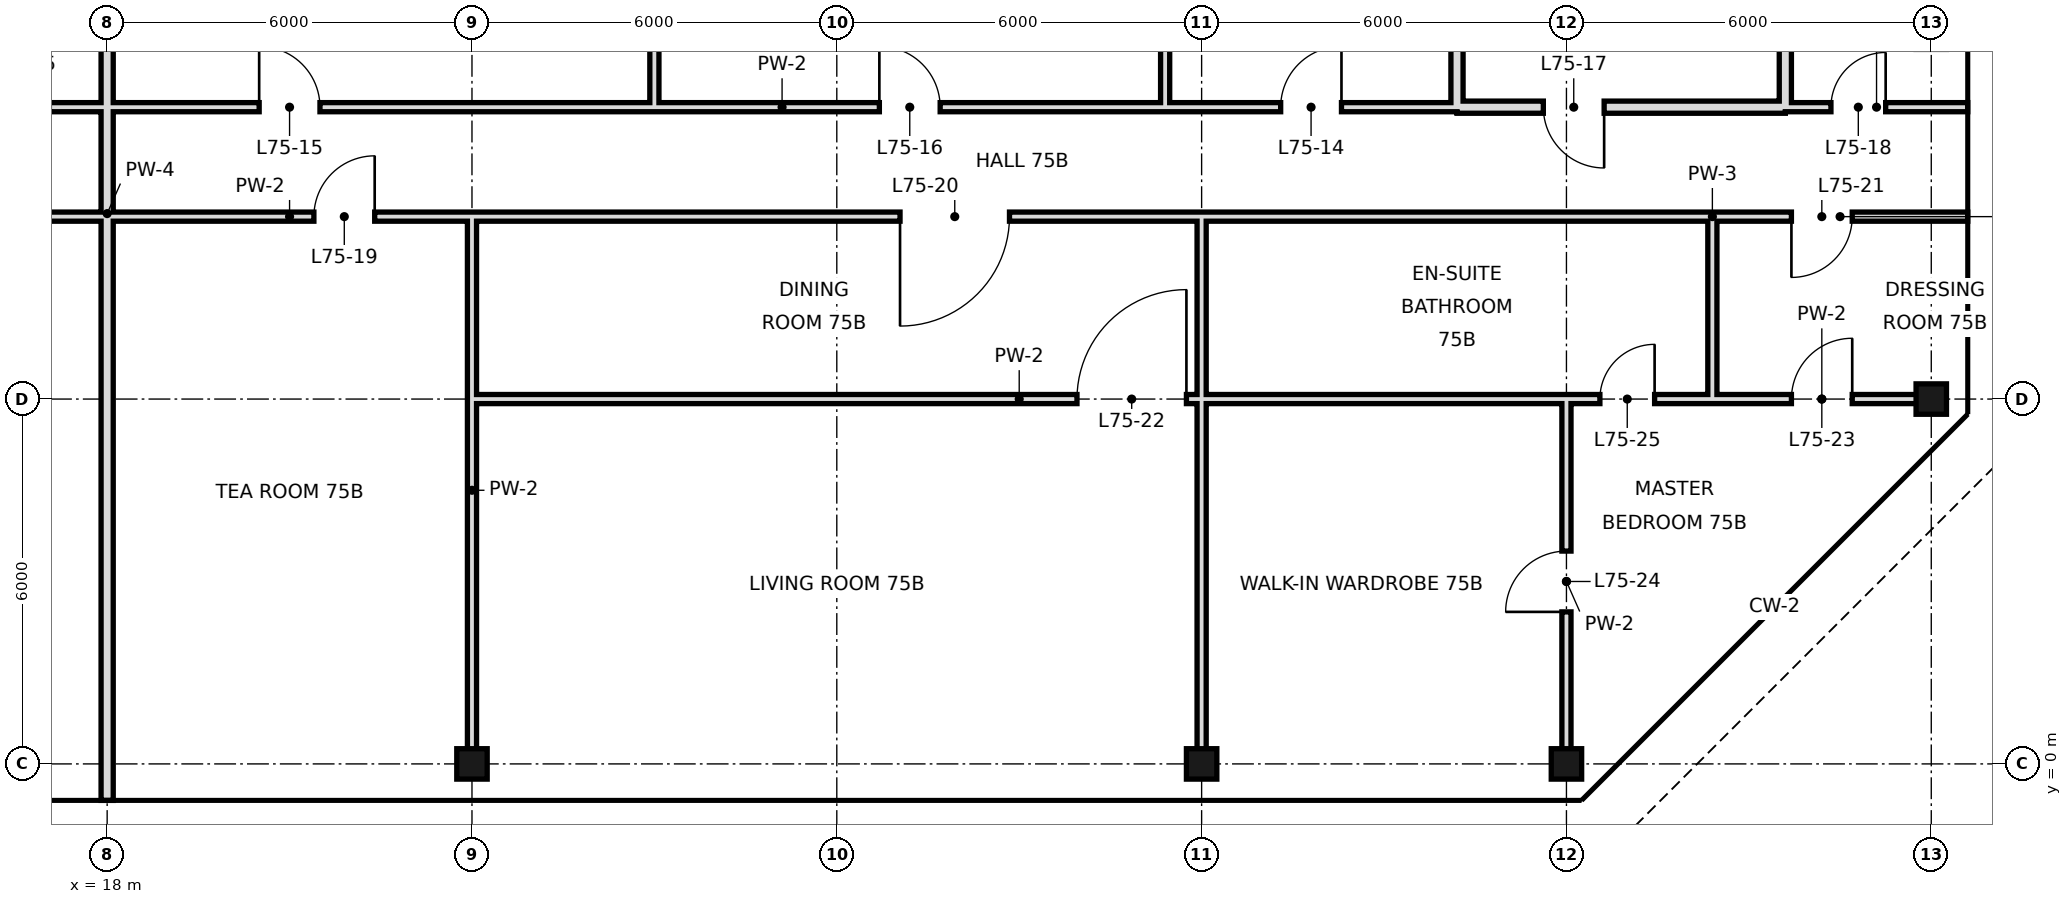
"""IFC4 building model, lengths in metres.
Left out: names, types, materials, properties, quantities, classifications, styles, units other than length and angle.
Written with IfcOpenShell. Run it as: python <this file> out.ifc"""

import sys

from ifc_helpers import new_model, si_unit, direction, frame, frame_2d, origin, origin_2d, place, context, subcontext, project, spatial, rectangle, hollow_rectangle, extrude, element, fill, save


model = new_model("IFC4")
c1 = context("Model", 3, precision=1e-05, world=origin(), true_north=direction((0.0, 1.0)))
c2 = subcontext(c1, "Body", "Model", "MODEL_VIEW")
j1 = project(units=[si_unit("LENGTHUNIT", "METRE"), si_unit("PLANEANGLEUNIT", "RADIAN")], contexts=[c1])
p1 = place(None, origin())
s1 = spatial("IfcSite", under=j1, at=p1, CompositionType="ELEMENT")
p2 = place(p1, origin())
s2 = spatial("IfcBuilding", under=s1, at=p2, CompositionType="ELEMENT")
p3 = place(p2, frame((0.0, 0.0, 316.0)))
s3 = spatial("IfcBuildingStorey", under=s2, at=p3, CompositionType="ELEMENT", Elevation=316.0)
for number, where, z_axis, x_axis in (
    (1, (24.0, 0.0, 0.0), (0.0, 0.0, 1.0), (1.0, 0.0, 0.0)),
    (2, (36.0, 0.0, 0.0), (0.0, 0.0, 1.0), (1.0, 0.0, 0.0)),
    (3, (42.0, 0.0, 0.0), (0.0, 0.0, 1.0), (1.0, 0.0, 0.0)),
    (4, (48.0, 6.0, 0.0), (0.0, 0.0, 1.0), (1.0, 0.0, 0.0)),
):
    element("IfcColumn", number, at=place(p3, frame(where, z_axis=z_axis, x_axis=x_axis)), inside=s3, PredefinedType="COLUMN", context=c2, shape_type="SweptSolid", body=[
        extrude(hollow_rectangle(XDim=0.5, YDim=0.5, WallThickness=0.025, at=origin_2d()), origin(), (0.0, 0.0, 1.0), 3.6),
    ])
p4 = place(p3, frame((18.0, -0.6, 0.0), z_axis=(0.0, 0.0, 1.0), x_axis=(0.0, 1.0, 0.0)))
e5 = element("IfcWall", 5, at=p4, inside=s3, PredefinedType="SOLIDWALL", context=c2, shape_type="SweptSolid", body=[
    extrude(rectangle(XDim=19.3, YDim=0.2, at=frame_2d((9.65, 0.0))), origin(), (0.0, 0.0, 1.0), 2.72),
])
p5 = place(p3, frame((24.0, 0.0, 0.0), z_axis=(0.0, 0.0, 1.0), x_axis=(0.0, 1.0, 0.0)))
e6 = element("IfcWall", 6, at=p5, inside=s3, PredefinedType="PARTITIONING", context=c2, shape_type="SweptSolid", body=[
    extrude(rectangle(XDim=9.0, YDim=0.15, at=frame_2d((4.5, 0.0))), origin(), (0.0, 0.0, 1.0), 2.72),
])
for number, where, z_axis, x_axis in (
    (7, (27.0, 10.8, 0.0), (0.0, 0.0, 1.0), (0.0, 1.0, 0.0)),
    (8, (35.4, 10.8, 0.0), (0.0, 0.0, 1.0), (0.0, 1.0, 0.0)),
):
    element("IfcWall", number, at=place(p3, frame(where, z_axis=z_axis, x_axis=x_axis)), inside=s3, PredefinedType="PARTITIONING", context=c2, shape_type="SweptSolid", body=[
        extrude(rectangle(XDim=7.9, YDim=0.15, at=frame_2d((3.95, 0.0))), origin(), (0.0, 0.0, 1.0), 3.42),
    ])
p6 = place(p3, frame((36.0, 0.0, 0.0), z_axis=(0.0, 0.0, 1.0), x_axis=(0.0, 1.0, 0.0)))
e9 = element("IfcWall", 9, at=p6, inside=s3, PredefinedType="PARTITIONING", context=c2, shape_type="SweptSolid", body=[
    extrude(rectangle(XDim=6.0, YDim=0.15, at=frame_2d((3.0, 0.0))), origin(), (0.0, 0.0, 1.0), 2.72),
])
p7 = place(p3, frame((36.0, 6.0, 0.0), z_axis=(0.0, 0.0, 1.0), x_axis=(0.0, 1.0, 0.0)))
e10 = element("IfcWall", 10, at=p7, inside=s3, PredefinedType="PARTITIONING", context=c2, shape_type="SweptSolid", body=[
    extrude(rectangle(XDim=3.0, YDim=0.15, at=frame_2d((1.5, 0.0))), origin(), (0.0, 0.0, 1.0), 2.72),
])
p8 = place(p3, frame((40.2, 10.8, 0.0), z_axis=(0.0, 0.0, 1.0), x_axis=(0.0, 1.0, 0.0)))
e11 = element("IfcWall", 11, at=p8, inside=s3, PredefinedType="SOLIDWALL", context=c2, shape_type="SweptSolid", body=[
    extrude(rectangle(XDim=7.9, YDim=0.2, at=frame_2d((3.95, 0.0))), origin(), (0.0, 0.0, 1.0), 2.72),
])
p9 = place(p3, frame((42.0, 0.0, 0.0), z_axis=(0.0, 0.0, 1.0), x_axis=(0.0, 1.0, 0.0)))
e12 = element("IfcWall", 12, at=p9, inside=s3, PredefinedType="PARTITIONING", context=c2, shape_type="SweptSolid", body=[
    extrude(rectangle(XDim=6.0, YDim=0.15, at=frame_2d((3.0, 0.0))), origin(), (0.0, 0.0, 1.0), 2.72),
])
p10 = place(p9, frame((2.5, 0.0, 0.0)))
e13 = element("IfcOpeningElement", 13, at=p10, cuts=e12, PredefinedType="OPENING", context=c2, shape_type="SweptSolid", body=[
    extrude(rectangle(XDim=1.0, YDim=2.4, at=frame_2d((0.5, 1.2))), frame((0.0, 0.085, 0.0), z_axis=(0.0, -1.0, 0.0), x_axis=(1.0, 0.0, 0.0)), (0.0, 0.0, 1.0), 0.17),
])
p11 = place(p3, frame((44.4, 6.0, 0.0), z_axis=(0.0, 0.0, 1.0), x_axis=(0.0, 1.0, 0.0)))
e14 = element("IfcWall", 14, at=p11, inside=s3, PredefinedType="PARTITIONING", context=c2, shape_type="SweptSolid", body=[
    extrude(rectangle(XDim=3.0, YDim=0.15, at=frame_2d((1.5, 0.0))), origin(), (0.0, 0.0, 1.0), 3.42),
])
p12 = place(p3, frame((45.6, 10.8, 0.0), z_axis=(0.0, 0.0, 1.0), x_axis=(0.0, 1.0, 0.0)))
e15 = element("IfcWall", 15, at=p12, inside=s3, PredefinedType="SOLIDWALL", context=c2, shape_type="SweptSolid", body=[
    extrude(rectangle(XDim=7.2, YDim=0.2, at=frame_2d((3.6, 0.0))), origin(), (0.0, 0.0, 1.0), 2.72),
])
p13 = place(p3, frame((40.2, 10.8, 0.0), z_axis=(0.0, 0.0, 1.0), x_axis=(1.0, 0.0, 0.0)))
e16 = element("IfcWall", 16, at=p13, inside=s3, PredefinedType="SOLIDWALL", context=c2, shape_type="SweptSolid", body=[
    extrude(rectangle(XDim=5.4, YDim=0.2, at=frame_2d((2.7, 0.0))), origin(), (0.0, 0.0, 1.0), 2.72),
])
p14 = place(p13, frame((1.42, 0.0, 0.0)))
e17 = element("IfcOpeningElement", 17, at=p14, cuts=e16, PredefinedType="OPENING", context=c2, shape_type="SweptSolid", body=[
    extrude(rectangle(XDim=1.0, YDim=2.4, at=frame_2d((0.5, 1.2))), frame((0.0, 0.11, 0.0), z_axis=(0.0, -1.0, 0.0), x_axis=(1.0, 0.0, 0.0)), (0.0, 0.0, 1.0), 0.22),
])
p15 = place(p3, frame((18.0, 10.8, 0.0), z_axis=(0.0, 0.0, 1.0), x_axis=(1.0, 0.0, 0.0)))
e18 = element("IfcWall", 18, at=p15, inside=s3, PredefinedType="PARTITIONING", context=c2, shape_type="SweptSolid", body=[
    extrude(rectangle(XDim=22.2, YDim=0.15, at=frame_2d((11.1, 0.0))), origin(), (0.0, 0.0, 1.0), 3.42),
])
p16 = place(p15, frame((19.3, 0.0, 0.0)))
e19 = element("IfcOpeningElement", 19, at=p16, cuts=e18, PredefinedType="OPENING", context=c2, shape_type="SweptSolid", body=[
    extrude(rectangle(XDim=1.0, YDim=2.4, at=frame_2d((0.5, 1.2))), frame((0.0, 0.085, 0.0), z_axis=(0.0, -1.0, 0.0), x_axis=(1.0, 0.0, 0.0)), (0.0, 0.0, 1.0), 0.17),
])
p17 = place(p15, frame((2.5, 0.0, 0.0)))
e20 = element("IfcOpeningElement", 20, at=p17, cuts=e18, PredefinedType="OPENING", context=c2, shape_type="SweptSolid", body=[
    extrude(rectangle(XDim=1.0, YDim=2.4, at=frame_2d((0.5, 1.2))), frame((0.0, 0.085, 0.0), z_axis=(0.0, -1.0, 0.0), x_axis=(1.0, 0.0, 0.0)), (0.0, 0.0, 1.0), 0.17),
])
p18 = place(p15, frame((12.7, 0.0, 0.0)))
e21 = element("IfcOpeningElement", 21, at=p18, cuts=e18, PredefinedType="OPENING", context=c2, shape_type="SweptSolid", body=[
    extrude(rectangle(XDim=1.0, YDim=2.4, at=frame_2d((0.5, 1.2))), frame((0.0, 0.085, 0.0), z_axis=(0.0, -1.0, 0.0), x_axis=(1.0, 0.0, 0.0)), (0.0, 0.0, 1.0), 0.17),
])
p19 = place(p3, frame((15.6, 10.8, 0.0), z_axis=(0.0, 0.0, 1.0), x_axis=(1.0, 0.0, 0.0)))
e22 = element("IfcWall", 22, at=p19, inside=s3, PredefinedType="PARTITIONING", context=c2, shape_type="SweptSolid", body=[
    extrude(rectangle(XDim=2.4, YDim=0.15, at=frame_2d((1.2, 0.0))), origin(), (0.0, 0.0, 1.0), 3.42),
])
p20 = place(p19, frame((0.55, 0.0, 0.0)))
e23 = element("IfcOpeningElement", 23, at=p20, cuts=e22, PredefinedType="OPENING", context=c2, shape_type="SweptSolid", body=[
    extrude(rectangle(XDim=0.9, YDim=2.4, at=frame_2d((0.45, 1.2))), frame((0.0, 0.085, 0.0), z_axis=(0.0, -1.0, 0.0), x_axis=(1.0, 0.0, 0.0)), (0.0, 0.0, 1.0), 0.17),
])
p21 = place(p3, frame((45.6, 10.8, 0.0), z_axis=(0.0, 0.0, 1.0), x_axis=(1.0, 0.0, 0.0)))
e24 = element("IfcWall", 24, at=p21, inside=s3, PredefinedType="PARTITIONING", context=c2, shape_type="SweptSolid", body=[
    extrude(rectangle(XDim=3.0, YDim=0.15, at=frame_2d((1.5, 0.0))), origin(), (0.0, 0.0, 1.0), 3.42),
])
p22 = place(p21, frame((0.75, 0.0, 0.0)))
e25 = element("IfcOpeningElement", 25, at=p22, cuts=e24, PredefinedType="OPENING", context=c2, shape_type="SweptSolid", body=[
    extrude(rectangle(XDim=0.9, YDim=2.4, at=frame_2d((0.45, 1.2))), frame((0.0, 0.085, 0.0), z_axis=(0.0, -1.0, 0.0), x_axis=(1.0, 0.0, 0.0)), (0.0, 0.0, 1.0), 0.17),
])
p23 = place(p3, frame((24.0, 6.0, 0.0), z_axis=(0.0, 0.0, 1.0), x_axis=(1.0, 0.0, 0.0)))
e26 = element("IfcWall", 26, at=p23, inside=s3, PredefinedType="PARTITIONING", context=c2, shape_type="SweptSolid", body=[
    extrude(rectangle(XDim=12.0, YDim=0.15, at=frame_2d((6.0, 0.0))), origin(), (0.0, 0.0, 1.0), 2.97),
])
p24 = place(p23, frame((9.95, 0.0, 0.0)))
e27 = element("IfcOpeningElement", 27, at=p24, cuts=e26, PredefinedType="OPENING", context=c2, shape_type="SweptSolid", body=[
    extrude(rectangle(XDim=1.8, YDim=2.4, at=frame_2d((0.9, 1.2))), frame((0.0, 0.085, 0.0), z_axis=(0.0, -1.0, 0.0), x_axis=(1.0, 0.0, 0.0)), (0.0, 0.0, 1.0), 0.17),
])
p25 = place(p3, frame((44.4, 6.0, 0.0), z_axis=(0.0, 0.0, 1.0), x_axis=(1.0, 0.0, 0.0)))
e28 = element("IfcWall", 28, at=p25, inside=s3, PredefinedType="PARTITIONING", context=c2, shape_type="SweptSolid", body=[
    extrude(rectangle(XDim=3.6, YDim=0.15, at=frame_2d((1.8, 0.0))), origin(), (0.0, 0.0, 1.0), 2.97),
])
p26 = place(p25, frame((1.3, 0.0, 0.0)))
e29 = element("IfcOpeningElement", 29, at=p26, cuts=e28, PredefinedType="OPENING", context=c2, shape_type="SweptSolid", body=[
    extrude(rectangle(XDim=1.0, YDim=2.4, at=frame_2d((0.5, 1.2))), frame((0.0, 0.085, 0.0), z_axis=(0.0, -1.0, 0.0), x_axis=(1.0, 0.0, 0.0)), (0.0, 0.0, 1.0), 0.17),
])
p27 = place(p3, frame((36.0, 6.0, 0.0), z_axis=(0.0, 0.0, 1.0), x_axis=(1.0, 0.0, 0.0)))
e30 = element("IfcWall", 30, at=p27, inside=s3, PredefinedType="PARTITIONING", context=c2, shape_type="SweptSolid", body=[
    extrude(rectangle(XDim=8.4, YDim=0.15, at=frame_2d((4.2, 0.0))), origin(), (0.0, 0.0, 1.0), 2.97),
])
p28 = place(p27, frame((6.55, 0.0, 0.0)))
e31 = element("IfcOpeningElement", 31, at=p28, cuts=e30, PredefinedType="OPENING", context=c2, shape_type="SweptSolid", body=[
    extrude(rectangle(XDim=0.9, YDim=2.4, at=frame_2d((0.45, 1.2))), frame((0.0, 0.085, 0.0), z_axis=(0.0, -1.0, 0.0), x_axis=(1.0, 0.0, 0.0)), (0.0, 0.0, 1.0), 0.17),
])
p29 = place(p3, frame((6.0, 9.0, 0.0), z_axis=(0.0, 0.0, 1.0), x_axis=(1.0, 0.0, 0.0)))
e32 = element("IfcWall", 32, at=p29, inside=s3, PredefinedType="PARTITIONING", context=c2, shape_type="SweptSolid", body=[
    extrude(rectangle(XDim=30.0, YDim=0.15, at=frame_2d((15.0, 0.0))), origin(), (0.0, 0.0, 1.0), 3.42),
])
p30 = place(p29, frame((2.5, 0.0, 0.0)))
e33 = element("IfcOpeningElement", 33, at=p30, cuts=e32, PredefinedType="OPENING", context=c2, shape_type="SweptSolid", body=[
    extrude(rectangle(XDim=1.0, YDim=2.4, at=frame_2d((0.5, 1.2))), frame((0.0, 0.085, 0.0), z_axis=(0.0, -1.0, 0.0), x_axis=(1.0, 0.0, 0.0)), (0.0, 0.0, 1.0), 0.17),
])
p31 = place(p29, frame((7.6, 0.0, 0.0)))
e34 = element("IfcOpeningElement", 34, at=p31, cuts=e32, PredefinedType="OPENING", context=c2, shape_type="SweptSolid", body=[
    extrude(rectangle(XDim=1.0, YDim=2.4, at=frame_2d((0.5, 1.2))), frame((0.0, 0.085, 0.0), z_axis=(0.0, -1.0, 0.0), x_axis=(1.0, 0.0, 0.0)), (0.0, 0.0, 1.0), 0.17),
])
p32 = place(p29, frame((15.4, 0.0, 0.0)))
e35 = element("IfcOpeningElement", 35, at=p32, cuts=e32, PredefinedType="OPENING", context=c2, shape_type="SweptSolid", body=[
    extrude(rectangle(XDim=1.0, YDim=2.4, at=frame_2d((0.5, 1.2))), frame((0.0, 0.085, 0.0), z_axis=(0.0, -1.0, 0.0), x_axis=(1.0, 0.0, 0.0)), (0.0, 0.0, 1.0), 0.17),
])
p33 = place(p29, frame((25.04, 0.0, 0.0)))
e36 = element("IfcOpeningElement", 36, at=p33, cuts=e32, PredefinedType="OPENING", context=c2, shape_type="SweptSolid", body=[
    extrude(rectangle(XDim=1.8, YDim=2.4, at=frame_2d((0.9, 1.2))), frame((0.0, 0.085, 0.0), z_axis=(0.0, -1.0, 0.0), x_axis=(1.0, 0.0, 0.0)), (0.0, 0.0, 1.0), 0.17),
])
p34 = place(p3, frame((44.4, 9.0, 0.0), z_axis=(0.0, 0.0, 1.0), x_axis=(1.0, 0.0, 0.0)))
e37 = element("IfcWall", 37, at=p34, inside=s3, PredefinedType="PARTITIONING", context=c2, shape_type="SweptSolid", body=[
    extrude(rectangle(XDim=4.2, YDim=0.15, at=frame_2d((2.1, 0.0))), origin(), (0.0, 0.0, 1.0), 3.42),
])
p35 = place(p34, frame((1.3, 0.0, 0.0)))
e38 = element("IfcOpeningElement", 38, at=p35, cuts=e37, PredefinedType="OPENING", context=c2, shape_type="SweptSolid", body=[
    extrude(rectangle(XDim=1.0, YDim=2.4, at=frame_2d((0.5, 1.2))), frame((0.0, 0.085, 0.0), z_axis=(0.0, -1.0, 0.0), x_axis=(1.0, 0.0, 0.0)), (0.0, 0.0, 1.0), 0.17),
])
p36 = place(p3, frame((36.0, 9.0, 0.0), z_axis=(0.0, 0.0, 1.0), x_axis=(1.0, 0.0, 0.0)))
e39 = element("IfcWall", 39, at=p36, inside=s3, PredefinedType="PARTITIONING", context=c2, shape_type="SweptSolid", body=[
    extrude(rectangle(XDim=8.4, YDim=0.15, at=frame_2d((4.2, 0.0))), origin(), (0.0, 0.0, 1.0), 3.42),
])
p37 = place(p16, frame((1.0, 0.0, 0.0), z_axis=(0.0, 0.0, 1.0), x_axis=(-1.0, 0.0, 0.0)))
e40 = element("IfcDoor", 40, at=p37, inside=s3, OperationType="SINGLE_SWING_LEFT", PredefinedType="DOOR", context=c2, shape_type="SweptSolid", body=[
    extrude(rectangle(XDim=1.0, YDim=2.4, at=frame_2d((0.5, 1.2))), frame((0.0, 0.025, 0.0), z_axis=(0.0, -1.0, 0.0), x_axis=(1.0, 0.0, 0.0)), (0.0, 0.0, 1.0), 0.05),
])
fill(e19, e40)
p38 = place(p17, origin())
e41 = element("IfcDoor", 41, at=p38, inside=s3, OperationType="SINGLE_SWING_LEFT", PredefinedType="DOOR", context=c2, shape_type="SweptSolid", body=[
    extrude(rectangle(XDim=1.0, YDim=2.4, at=frame_2d((0.5, 1.2))), frame((0.0, 0.025, 0.0), z_axis=(0.0, -1.0, 0.0), x_axis=(1.0, 0.0, 0.0)), (0.0, 0.0, 1.0), 0.05),
])
fill(e20, e41)
p39 = place(p18, origin())
e42 = element("IfcDoor", 42, at=p39, inside=s3, OperationType="SINGLE_SWING_LEFT", PredefinedType="DOOR", context=c2, shape_type="SweptSolid", body=[
    extrude(rectangle(XDim=1.0, YDim=2.4, at=frame_2d((0.5, 1.2))), frame((0.0, 0.025, 0.0), z_axis=(0.0, -1.0, 0.0), x_axis=(1.0, 0.0, 0.0)), (0.0, 0.0, 1.0), 0.05),
])
fill(e21, e42)
p40 = place(p14, origin())
e43 = element("IfcDoor", 43, at=p40, inside=s3, OperationType="SINGLE_SWING_RIGHT", PredefinedType="DOOR", context=c2, shape_type="SweptSolid", body=[
    extrude(rectangle(XDim=1.0, YDim=2.4, at=frame_2d((0.5, 1.2))), frame((0.0, 0.025, 0.0), z_axis=(0.0, -1.0, 0.0), x_axis=(1.0, 0.0, 0.0)), (0.0, 0.0, 1.0), 0.05),
])
fill(e17, e43)
p41 = place(p22, frame((0.9, 0.0, 0.0), z_axis=(0.0, 0.0, 1.0), x_axis=(-1.0, 0.0, 0.0)))
e44 = element("IfcDoor", 44, at=p41, inside=s3, OperationType="SINGLE_SWING_LEFT", PredefinedType="DOOR", context=c2, shape_type="SweptSolid", body=[
    extrude(rectangle(XDim=0.9, YDim=2.4, at=frame_2d((0.45, 1.2))), frame((0.0, 0.025, 0.0), z_axis=(0.0, -1.0, 0.0), x_axis=(1.0, 0.0, 0.0)), (0.0, 0.0, 1.0), 0.05),
])
fill(e25, e44)
p42 = place(p32, frame((1.0, 0.0, 0.0), z_axis=(0.0, 0.0, 1.0), x_axis=(-1.0, 0.0, 0.0)))
e45 = element("IfcDoor", 45, at=p42, inside=s3, OperationType="SINGLE_SWING_LEFT", PredefinedType="DOOR", context=c2, shape_type="SweptSolid", body=[
    extrude(rectangle(XDim=1.0, YDim=2.4, at=frame_2d((0.5, 1.2))), frame((0.0, 0.025, 0.0), z_axis=(0.0, -1.0, 0.0), x_axis=(1.0, 0.0, 0.0)), (0.0, 0.0, 1.0), 0.05),
])
fill(e35, e45)
p43 = place(p33, frame((1.8, 0.0, 0.0), z_axis=(0.0, 0.0, 1.0), x_axis=(-1.0, 0.0, 0.0)))
e46 = element("IfcDoor", 46, at=p43, inside=s3, OperationType="SINGLE_SWING_RIGHT", PredefinedType="DOOR", context=c2, shape_type="SweptSolid", body=[
    extrude(rectangle(XDim=1.8, YDim=2.4, at=frame_2d((0.9, 1.2))), frame((0.0, 0.025, 0.0), z_axis=(0.0, -1.0, 0.0), x_axis=(1.0, 0.0, 0.0)), (0.0, 0.0, 1.0), 0.05),
])
fill(e36, e46)
p44 = place(p35, frame((1.0, 0.0, 0.0), z_axis=(0.0, 0.0, 1.0), x_axis=(-1.0, 0.0, 0.0)))
e47 = element("IfcDoor", 47, at=p44, inside=s3, OperationType="SINGLE_SWING_RIGHT", PredefinedType="DOOR", context=c2, shape_type="SweptSolid", body=[
    extrude(rectangle(XDim=1.0, YDim=2.4, at=frame_2d((0.5, 1.2))), frame((0.0, 0.025, 0.0), z_axis=(0.0, -1.0, 0.0), x_axis=(1.0, 0.0, 0.0)), (0.0, 0.0, 1.0), 0.05),
])
fill(e38, e47)
p45 = place(p24, frame((1.8, 0.0, 0.0), z_axis=(0.0, 0.0, 1.0), x_axis=(-1.0, 0.0, 0.0)))
e48 = element("IfcDoor", 48, at=p45, inside=s3, OperationType="SINGLE_SWING_LEFT", PredefinedType="DOOR", context=c2, shape_type="SweptSolid", body=[
    extrude(rectangle(XDim=1.8, YDim=2.4, at=frame_2d((0.9, 1.2))), frame((0.0, 0.025, 0.0), z_axis=(0.0, -1.0, 0.0), x_axis=(1.0, 0.0, 0.0)), (0.0, 0.0, 1.0), 0.05),
])
fill(e27, e48)
p46 = place(p26, frame((1.0, 0.0, 0.0), z_axis=(0.0, 0.0, 1.0), x_axis=(-1.0, 0.0, 0.0)))
e49 = element("IfcDoor", 49, at=p46, inside=s3, OperationType="SINGLE_SWING_LEFT", PredefinedType="DOOR", context=c2, shape_type="SweptSolid", body=[
    extrude(rectangle(XDim=1.0, YDim=2.4, at=frame_2d((0.5, 1.2))), frame((0.0, 0.025, 0.0), z_axis=(0.0, -1.0, 0.0), x_axis=(1.0, 0.0, 0.0)), (0.0, 0.0, 1.0), 0.05),
])
fill(e29, e49)
p47 = place(p10, origin())
e50 = element("IfcDoor", 50, at=p47, inside=s3, OperationType="SINGLE_SWING_LEFT", PredefinedType="DOOR", context=c2, shape_type="SweptSolid", body=[
    extrude(rectangle(XDim=1.0, YDim=2.4, at=frame_2d((0.5, 1.2))), frame((0.0, 0.025, 0.0), z_axis=(0.0, -1.0, 0.0), x_axis=(1.0, 0.0, 0.0)), (0.0, 0.0, 1.0), 0.05),
])
fill(e13, e50)
p48 = place(p28, frame((0.9, 0.0, 0.0), z_axis=(0.0, 0.0, 1.0), x_axis=(-1.0, 0.0, 0.0)))
e51 = element("IfcDoor", 51, at=p48, inside=s3, OperationType="SINGLE_SWING_LEFT", PredefinedType="DOOR", context=c2, shape_type="SweptSolid", body=[
    extrude(rectangle(XDim=0.9, YDim=2.4, at=frame_2d((0.45, 1.2))), frame((0.0, 0.025, 0.0), z_axis=(0.0, -1.0, 0.0), x_axis=(1.0, 0.0, 0.0)), (0.0, 0.0, 1.0), 0.05),
])
fill(e31, e51)
save(model, sys.argv[1])
